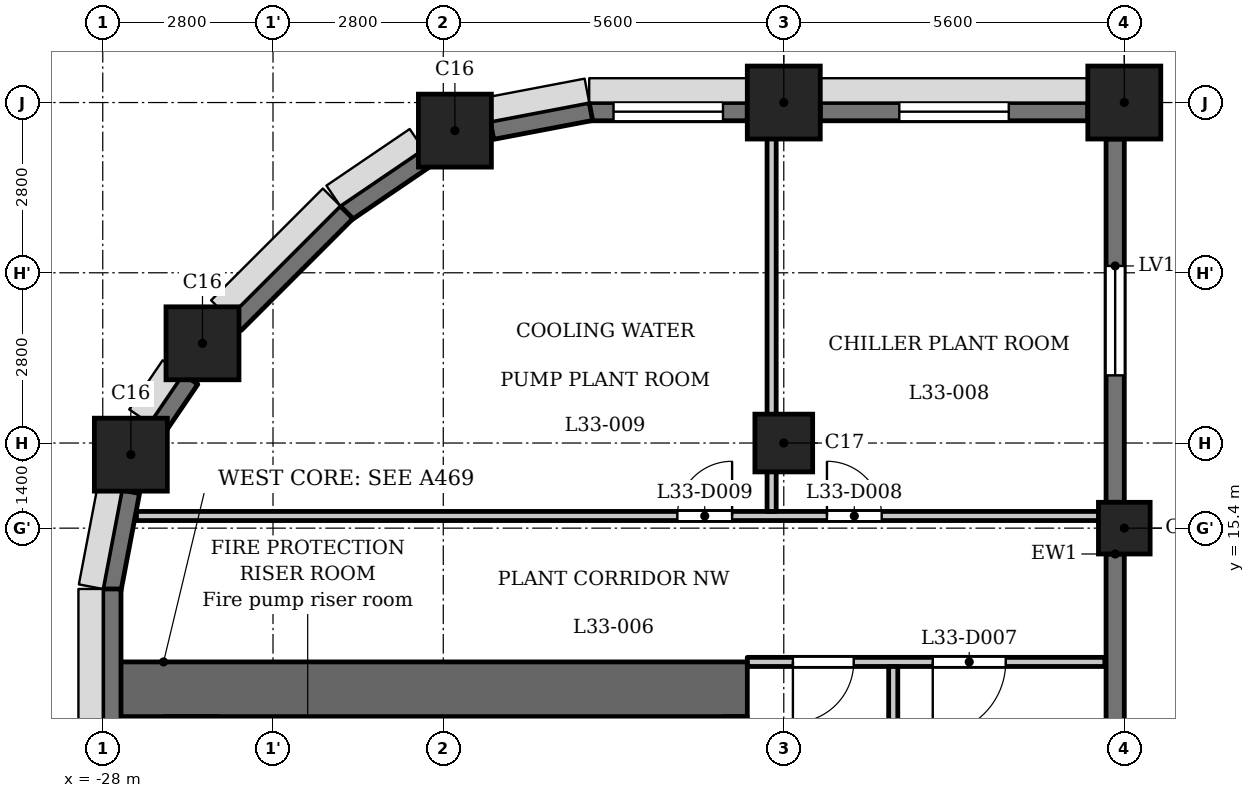
"""IFC4 building model, lengths in metres.
Left out: names, types, materials, properties, quantities, classifications, styles, units other than length and angle.
Written with IfcOpenShell. Run it as: python <this file> out.ifc"""

import sys

from ifc_helpers import new_model, si_unit, direction, frame, frame_2d, origin, origin_2d, place, context, subcontext, project, spatial, rectangle, extrude, element, fill, save


model = new_model("IFC4")
c1 = context("Model", 3, precision=1e-05, world=origin(), true_north=direction((0.0, 1.0)))
c2 = subcontext(c1, "Body", "Model", "MODEL_VIEW")
j1 = project(units=[si_unit("LENGTHUNIT", "METRE"), si_unit("PLANEANGLEUNIT", "RADIAN")], contexts=[c1])
p1 = place(None, origin())
s1 = spatial("IfcSite", under=j1, at=p1, CompositionType="ELEMENT")
p2 = place(p1, origin())
s2 = spatial("IfcBuilding", under=s1, at=p2, CompositionType="ELEMENT")
p3 = place(p2, frame((0.0, 0.0, 130.7)))
s3 = spatial("IfcBuildingStorey", under=s2, at=p3, CompositionType="ELEMENT", Elevation=130.7)
for number, where, z_axis, x_axis in (
    (1, (-11.2, 22.4, 0.0), (0.0, 0.0, 1.0), (1.0, 0.0, 0.0)),
    (2, (-16.8, 22.4, 0.0), (0.0, 0.0, 1.0), (1.0, 0.0, 0.0)),
    (3, (-22.209, 21.938, 0.0), (0.0, 0.0, 1.0), (1.0, 0.0, 0.0)),
    (4, (-26.36, 18.44, 0.0), (0.0, 0.0, 1.0), (1.0, 0.0, 0.0)),
    (5, (-27.538, 16.609, 0.0), (0.0, 0.0, 1.0), (1.0, 0.0, 0.0)),
):
    element("IfcColumn", number, at=place(p3, frame(where, z_axis=z_axis, x_axis=x_axis)), inside=s3, PredefinedType="COLUMN", context=c2, shape_type="SweptSolid", body=[
        extrude(rectangle(XDim=1.2, YDim=1.2, at=origin_2d()), origin(), (0.0, 0.0, 1.0), 5.4),
    ])
p4 = place(p3, frame((-16.8, 16.8, 0.0), z_axis=(0.0, 0.0, 1.0), x_axis=(1.0, 0.0, 0.0)))
e6 = element("IfcColumn", 6, at=p4, inside=s3, PredefinedType="COLUMN", context=c2, shape_type="SweptSolid", body=[
    extrude(rectangle(XDim=0.95, YDim=0.95, at=origin_2d()), origin(), (0.0, 0.0, 1.0), 5.4),
])
p5 = place(p3, frame((-11.2, 15.4, 0.0), z_axis=(0.0, 0.0, 1.0), x_axis=(1.0, 0.0, 0.0)))
e7 = element("IfcColumn", 7, at=p5, inside=s3, PredefinedType="COLUMN", context=c2, shape_type="SweptSolid", body=[
    extrude(rectangle(XDim=0.85, YDim=0.85, at=origin_2d()), origin(), (0.0, 0.0, 1.0), 5.4),
])
p6 = place(p3, frame((-11.35, 8.875, 0.0), z_axis=(0.0, 0.0, 1.0), x_axis=(0.0, 1.0, 0.0)))
e8 = element("IfcWall", 8, at=p6, inside=s3, PredefinedType="SOLIDWALL", context=c2, shape_type="SweptSolid", body=[
    extrude(rectangle(XDim=6.1, YDim=0.3, at=frame_2d((3.05, 0.0))), origin(), (0.0, 0.0, 1.0), 5.1),
])
p7 = place(p6, frame((1.225, 0.0, 0.9)))
e9 = element("IfcOpeningElement", 9, at=p7, cuts=e8, PredefinedType="OPENING", context=c2, shape_type="SweptSolid", body=[
    extrude(rectangle(XDim=1.8, YDim=1.5, at=frame_2d((0.9, 0.75))), frame((0.0, 0.16, 0.0), z_axis=(0.0, -1.0, 0.0), x_axis=(1.0, 0.0, 0.0)), (0.0, 0.0, 1.0), 0.32),
])
p8 = place(p3, frame((-11.35, 15.825, 0.0), z_axis=(0.0, 0.0, 1.0), x_axis=(0.0, 1.0, 0.0)))
e10 = element("IfcWall", 10, at=p8, inside=s3, PredefinedType="SOLIDWALL", context=c2, shape_type="SweptSolid", body=[
    extrude(rectangle(XDim=5.975, YDim=0.3, at=frame_2d((2.988, 0.0))), origin(), (0.0, 0.0, 1.0), 5.1),
])
p9 = place(p8, frame((2.087, 0.0, 0.9)))
e11 = element("IfcOpeningElement", 11, at=p9, cuts=e10, PredefinedType="OPENING", context=c2, shape_type="SweptSolid", body=[
    extrude(rectangle(XDim=1.8, YDim=1.5, at=frame_2d((0.9, 0.75))), frame((0.0, 0.16, 0.0), z_axis=(0.0, -1.0, 0.0), x_axis=(1.0, 0.0, 0.0)), (0.0, 0.0, 1.0), 0.32),
])
p10 = place(p3, frame((-11.8, 22.25, 0.0), z_axis=(0.0, 0.0, 1.0), x_axis=(-1.0, 0.0, 0.0)))
e12 = element("IfcWall", 12, at=p10, inside=s3, PredefinedType="SOLIDWALL", context=c2, shape_type="SweptSolid", body=[
    extrude(rectangle(XDim=4.4, YDim=0.3, at=frame_2d((2.2, 0.0))), origin(), (0.0, 0.0, 1.0), 4.3),
])
p11 = place(p10, frame((1.3, 0.0, 0.9)))
e13 = element("IfcOpeningElement", 13, at=p11, cuts=e12, PredefinedType="OPENING", context=c2, shape_type="SweptSolid", body=[
    extrude(rectangle(XDim=1.8, YDim=1.5, at=frame_2d((0.9, 0.75))), frame((0.0, 0.16, 0.0), z_axis=(0.0, -1.0, 0.0), x_axis=(1.0, 0.0, 0.0)), (0.0, 0.0, 1.0), 0.32),
])
p12 = place(p3, frame((-17.4, 22.25, 0.0), z_axis=(0.0, 0.0, 1.0), x_axis=(-1.0, 0.0, 0.0)))
e14 = element("IfcWall", 14, at=p12, inside=s3, PredefinedType="SOLIDWALL", context=c2, shape_type="SweptSolid", body=[
    extrude(rectangle(XDim=2.6, YDim=0.3, at=frame_2d((1.3, 0.0))), origin(), (0.0, 0.0, 1.0), 4.3),
])
p13 = place(p12, frame((0.4, 0.0, 0.9)))
e15 = element("IfcOpeningElement", 15, at=p13, cuts=e14, PredefinedType="OPENING", context=c2, shape_type="SweptSolid", body=[
    extrude(rectangle(XDim=1.8, YDim=1.5, at=frame_2d((0.9, 0.75))), frame((0.0, 0.16, 0.0), z_axis=(0.0, -1.0, 0.0), x_axis=(1.0, 0.0, 0.0)), (0.0, 0.0, 1.0), 0.32),
])
for number, where, z_axis, x_axis in (
    (16, (-19.972, 22.253, 0.0), (0.0, 0.0, 1.0), (-0.982, -0.187, 0.0)),
    (17, (-22.643, 21.51, 0.0), (0.0, 0.0, 1.0), (-0.827, -0.562, 0.0)),
):
    element("IfcWall", number, at=place(p3, frame(where, z_axis=z_axis, x_axis=x_axis)), inside=s3, PredefinedType="SOLIDWALL", context=c2, shape_type="SweptSolid", body=[
        extrude(rectangle(XDim=1.656, YDim=0.3, at=frame_2d((0.828, 0.0))), origin(), (0.0, 0.0, 1.0), 4.3),
    ])
p14 = place(p3, frame((-23.991, 20.597, 0.0), z_axis=(0.0, 0.0, 1.0), x_axis=(-0.707106781187, -0.707106781187, 0.0)))
e18 = element("IfcWall", 18, at=p14, inside=s3, PredefinedType="SOLIDWALL", context=c2, shape_type="SweptSolid", body=[
    extrude(rectangle(XDim=2.6, YDim=0.3, at=frame_2d((1.3, 0.0))), origin(), (0.0, 0.0, 1.0), 4.3),
])
p15 = place(p3, frame((-26.561, 17.851, 0.0), z_axis=(0.0, 0.0, 1.0), x_axis=(-0.562173331661, -0.827019434577, 0.0)))
e19 = element("IfcWall", 19, at=p15, inside=s3, PredefinedType="SOLIDWALL", context=c2, shape_type="SweptSolid", body=[
    extrude(rectangle(XDim=0.977, YDim=0.3, at=frame_2d((0.489, 0.0))), origin(), (0.0, 0.0, 1.0), 5.1),
])
p16 = place(p3, frame((-27.542, 15.999, 0.0), z_axis=(0.0, 0.0, 1.0), x_axis=(-0.187349172861, -0.982293381546, 0.0)))
e20 = element("IfcWall", 20, at=p16, inside=s3, PredefinedType="SOLIDWALL", context=c2, shape_type="SweptSolid", body=[
    extrude(rectangle(XDim=1.656, YDim=0.3, at=frame_2d((0.828, 0.0))), origin(), (0.0, 0.0, 1.0), 4.3),
])
p17 = place(p3, frame((-27.85, 14.4, 0.0), z_axis=(0.0, 0.0, 1.0), x_axis=(0.0, -1.0, 0.0)))
e21 = element("IfcWall", 21, at=p17, inside=s3, PredefinedType="SOLIDWALL", context=c2, shape_type="SweptSolid", body=[
    extrude(rectangle(XDim=2.6, YDim=0.3, at=frame_2d((1.3, 0.0))), origin(), (0.0, 0.0, 1.0), 4.3),
])
p18 = place(p3, frame((-17.4, 12.75, 0.0), z_axis=(0.0, 0.0, 1.0), x_axis=(-1.0, 0.0, 0.0)))
e22 = element("IfcWall", 22, at=p18, inside=s3, PredefinedType="SHEAR", context=c2, shape_type="SweptSolid", body=[
    extrude(rectangle(XDim=10.4, YDim=0.9, at=frame_2d((5.2, 0.0))), origin(), (0.0, 0.0, 1.0), 5.1),
])
p19 = place(p3, frame((-17.6, -12.3, 0.0), z_axis=(0.0, 0.0, 1.0), x_axis=(0.0, 1.0, 0.0)))
e23 = element("IfcWall", 23, at=p19, inside=s3, PredefinedType="SHEAR", context=c2, shape_type="SweptSolid", body=[
    extrude(rectangle(XDim=24.6, YDim=0.4, at=frame_2d((12.3, 0.0))), origin(), (0.0, 0.0, 1.0), 5.1),
])
p20 = place(p19, frame((15.45, 0.0, 0.0)))
e24 = element("IfcOpeningElement", 24, at=p20, cuts=e23, PredefinedType="OPENING", context=c2, shape_type="SweptSolid", body=[
    extrude(rectangle(XDim=1.1, YDim=2.1, at=frame_2d((0.55, 1.05))), frame((0.0, 0.21, 0.0), z_axis=(0.0, -1.0, 0.0), x_axis=(1.0, 0.0, 0.0)), (0.0, 0.0, 1.0), 0.42),
])
p21 = place(p19, frame((17.85, 0.0, 0.0)))
e25 = element("IfcOpeningElement", 25, at=p21, cuts=e23, PredefinedType="OPENING", context=c2, shape_type="SweptSolid", body=[
    extrude(rectangle(XDim=1.1, YDim=2.1, at=frame_2d((0.55, 1.05))), frame((0.0, 0.21, 0.0), z_axis=(0.0, -1.0, 0.0), x_axis=(1.0, 0.0, 0.0)), (0.0, 0.0, 1.0), 0.42),
])
p22 = place(p19, frame((22.8, 0.0, 0.0)))
e26 = element("IfcOpeningElement", 26, at=p22, cuts=e23, PredefinedType="OPENING", context=c2, shape_type="SweptSolid", body=[
    extrude(rectangle(XDim=1.1, YDim=2.1, at=frame_2d((0.55, 1.05))), frame((0.0, 0.21, 0.0), z_axis=(0.0, -1.0, 0.0), x_axis=(1.0, 0.0, 0.0)), (0.0, 0.0, 1.0), 0.42),
])
p23 = place(p19, frame((0.7, 0.0, 0.0)))
e27 = element("IfcOpeningElement", 27, at=p23, cuts=e23, PredefinedType="OPENING", context=c2, shape_type="SweptSolid", body=[
    extrude(rectangle(XDim=1.1, YDim=2.1, at=frame_2d((0.55, 1.05))), frame((0.0, 0.21, 0.0), z_axis=(0.0, -1.0, 0.0), x_axis=(1.0, 0.0, 0.0)), (0.0, 0.0, 1.0), 0.42),
])
p24 = place(p19, frame((12.775, 0.0, 0.0)))
e28 = element("IfcOpeningElement", 28, at=p24, cuts=e23, PredefinedType="OPENING", context=c2, shape_type="SweptSolid", body=[
    extrude(rectangle(XDim=1.8, YDim=2.1, at=frame_2d((0.9, 1.05))), frame((0.0, 0.21, 0.0), z_axis=(0.0, -1.0, 0.0), x_axis=(1.0, 0.0, 0.0)), (0.0, 0.0, 1.0), 0.42),
])
p25 = place(p3, frame((-26.55, -12.3, 0.0), z_axis=(0.0, 0.0, 1.0), x_axis=(0.0, 1.0, 0.0)))
e29 = element("IfcWall", 29, at=p25, inside=s3, PredefinedType="SHEAR", context=c2, shape_type="SweptSolid", body=[
    extrude(rectangle(XDim=24.6, YDim=0.9, at=frame_2d((12.3, 0.0))), origin(), (0.0, 0.0, 1.0), 5.1),
])
p26 = place(p3, frame((-23.55, 9.8, 0.0), z_axis=(0.0, 0.0, 1.0), x_axis=(0.0, 1.0, 0.0)))
e30 = element("IfcWall", 30, at=p26, inside=s3, PredefinedType="PARTITIONING", context=c2, shape_type="SweptSolid", body=[
    extrude(rectangle(XDim=2.5, YDim=0.2, at=frame_2d((1.25, 0.0))), origin(), (0.0, 0.0, 1.0), 5.1),
])
p27 = place(p26, frame((0.8, 0.0, 0.0)))
e31 = element("IfcOpeningElement", 31, at=p27, cuts=e30, PredefinedType="OPENING", context=c2, shape_type="SweptSolid", body=[
    extrude(rectangle(XDim=0.9, YDim=2.1, at=frame_2d((0.45, 1.05))), frame((0.0, 0.11, 0.0), z_axis=(0.0, -1.0, 0.0), x_axis=(1.0, 0.0, 0.0)), (0.0, 0.0, 1.0), 0.22),
])
p28 = place(p3, frame((-17.4, 13.2, 0.0), z_axis=(0.0, 0.0, 1.0), x_axis=(1.0, 0.0, 0.0)))
e32 = element("IfcWall", 32, at=p28, inside=s3, PredefinedType="PARTITIONING", context=c2, shape_type="SweptSolid", body=[
    extrude(rectangle(XDim=5.88, YDim=0.15, at=frame_2d((2.94, 0.0))), origin(), (0.0, 0.0, 1.0), 5.1),
])
p29 = place(p28, frame((0.75, 0.0, 0.0)))
e33 = element("IfcOpeningElement", 33, at=p29, cuts=e32, PredefinedType="OPENING", context=c2, shape_type="SweptSolid", body=[
    extrude(rectangle(XDim=1.0, YDim=2.1, at=frame_2d((0.5, 1.05))), frame((0.0, 0.085, 0.0), z_axis=(0.0, -1.0, 0.0), x_axis=(1.0, 0.0, 0.0)), (0.0, 0.0, 1.0), 0.17),
])
p30 = place(p28, frame((3.05, 0.0, 0.0)))
e34 = element("IfcOpeningElement", 34, at=p30, cuts=e32, PredefinedType="OPENING", context=c2, shape_type="SweptSolid", body=[
    extrude(rectangle(XDim=1.2, YDim=2.1, at=frame_2d((0.6, 1.05))), frame((0.0, 0.085, 0.0), z_axis=(0.0, -1.0, 0.0), x_axis=(1.0, 0.0, 0.0)), (0.0, 0.0, 1.0), 0.17),
])
p31 = place(p3, frame((-27.446, 15.6, 0.0), z_axis=(0.0, 0.0, 1.0), x_axis=(1.0, 0.0, 0.0)))
e35 = element("IfcWall", 35, at=p31, inside=s3, PredefinedType="PARTITIONING", context=c2, shape_type="SweptSolid", body=[
    extrude(rectangle(XDim=16.156, YDim=0.15, at=frame_2d((8.078, 0.0))), origin(), (0.0, 0.0, 1.0), 5.1),
])
p32 = place(p31, frame((11.356, 0.0, 0.0)))
e36 = element("IfcOpeningElement", 36, at=p32, cuts=e35, PredefinedType="OPENING", context=c2, shape_type="SweptSolid", body=[
    extrude(rectangle(XDim=0.9, YDim=2.1, at=frame_2d((0.45, 1.05))), frame((0.0, 0.085, 0.0), z_axis=(0.0, -1.0, 0.0), x_axis=(1.0, 0.0, 0.0)), (0.0, 0.0, 1.0), 0.17),
])
p33 = place(p31, frame((8.896, 0.0, 0.0)))
e37 = element("IfcOpeningElement", 37, at=p33, cuts=e35, PredefinedType="OPENING", context=c2, shape_type="SweptSolid", body=[
    extrude(rectangle(XDim=0.9, YDim=2.1, at=frame_2d((0.45, 1.05))), frame((0.0, 0.085, 0.0), z_axis=(0.0, -1.0, 0.0), x_axis=(1.0, 0.0, 0.0)), (0.0, 0.0, 1.0), 0.17),
])
p34 = place(p3, frame((-17.0, 15.675, 0.0), z_axis=(0.0, 0.0, 1.0), x_axis=(0.0, 1.0, 0.0)))
e38 = element("IfcWall", 38, at=p34, inside=s3, PredefinedType="PARTITIONING", context=c2, shape_type="SweptSolid", body=[
    extrude(rectangle(XDim=6.635, YDim=0.15, at=frame_2d((3.317, 0.0))), origin(), (0.0, 0.0, 1.0), 5.1),
])
p35 = place(p3, frame((-15.0, 6.769, 0.0), z_axis=(0.0, 0.0, 1.0), x_axis=(0.0, 1.0, 0.0)))
e39 = element("IfcWall", 39, at=p35, inside=s3, PredefinedType="PARTITIONING", context=c2, shape_type="SweptSolid", body=[
    extrude(rectangle(XDim=6.356, YDim=0.15, at=frame_2d((3.178, 0.0))), origin(), (0.0, 0.0, 1.0), 5.1),
])
p36 = place(p29, origin())
e40 = element("IfcDoor", 40, at=p36, inside=s3, OperationType="SINGLE_SWING_LEFT", PredefinedType="DOOR", context=c2, shape_type="SweptSolid", body=[
    extrude(rectangle(XDim=1.0, YDim=2.1, at=frame_2d((0.5, 1.05))), frame((0.0, 0.025, 0.0), z_axis=(0.0, -1.0, 0.0), x_axis=(1.0, 0.0, 0.0)), (0.0, 0.0, 1.0), 0.05),
])
fill(e33, e40)
p37 = place(p30, origin())
e41 = element("IfcDoor", 41, at=p37, inside=s3, OperationType="SINGLE_SWING_LEFT", PredefinedType="DOOR", context=c2, shape_type="SweptSolid", body=[
    extrude(rectangle(XDim=1.2, YDim=2.1, at=frame_2d((0.6, 1.05))), frame((0.0, 0.025, 0.0), z_axis=(0.0, -1.0, 0.0), x_axis=(1.0, 0.0, 0.0)), (0.0, 0.0, 1.0), 0.05),
])
fill(e34, e41)
p38 = place(p32, origin())
e42 = element("IfcDoor", 42, at=p38, inside=s3, OperationType="SINGLE_SWING_RIGHT", PredefinedType="DOOR", context=c2, shape_type="SweptSolid", body=[
    extrude(rectangle(XDim=0.9, YDim=2.1, at=frame_2d((0.45, 1.05))), frame((0.0, 0.025, 0.0), z_axis=(0.0, -1.0, 0.0), x_axis=(1.0, 0.0, 0.0)), (0.0, 0.0, 1.0), 0.05),
])
fill(e36, e42)
p39 = place(p33, origin())
e43 = element("IfcDoor", 43, at=p39, inside=s3, OperationType="SINGLE_SWING_LEFT", PredefinedType="DOOR", context=c2, shape_type="SweptSolid", body=[
    extrude(rectangle(XDim=0.9, YDim=2.1, at=frame_2d((0.45, 1.05))), frame((0.0, 0.025, 0.0), z_axis=(0.0, -1.0, 0.0), x_axis=(1.0, 0.0, 0.0)), (0.0, 0.0, 1.0), 0.05),
])
fill(e37, e43)
p40 = place(p9, origin())
e44 = element("IfcWindow", 44, at=p40, inside=s3, PartitioningType="SINGLE_PANEL", PredefinedType="WINDOW", context=c2, shape_type="SweptSolid", body=[
    extrude(rectangle(XDim=1.8, YDim=1.5, at=frame_2d((0.9, 0.75))), frame((0.0, 0.03, 0.0), z_axis=(0.0, -1.0, 0.0), x_axis=(1.0, 0.0, 0.0)), (0.0, 0.0, 1.0), 0.06),
])
fill(e11, e44)
p41 = place(p11, origin())
e45 = element("IfcWindow", 45, at=p41, inside=s3, PartitioningType="SINGLE_PANEL", PredefinedType="WINDOW", context=c2, shape_type="SweptSolid", body=[
    extrude(rectangle(XDim=1.8, YDim=1.5, at=frame_2d((0.9, 0.75))), frame((0.0, 0.03, 0.0), z_axis=(0.0, -1.0, 0.0), x_axis=(1.0, 0.0, 0.0)), (0.0, 0.0, 1.0), 0.06),
])
fill(e13, e45)
p42 = place(p13, origin())
e46 = element("IfcWindow", 46, at=p42, inside=s3, PartitioningType="SINGLE_PANEL", PredefinedType="WINDOW", context=c2, shape_type="SweptSolid", body=[
    extrude(rectangle(XDim=1.8, YDim=1.5, at=frame_2d((0.9, 0.75))), frame((0.0, 0.03, 0.0), z_axis=(0.0, -1.0, 0.0), x_axis=(1.0, 0.0, 0.0)), (0.0, 0.0, 1.0), 0.06),
])
fill(e15, e46)
save(model, sys.argv[1])
